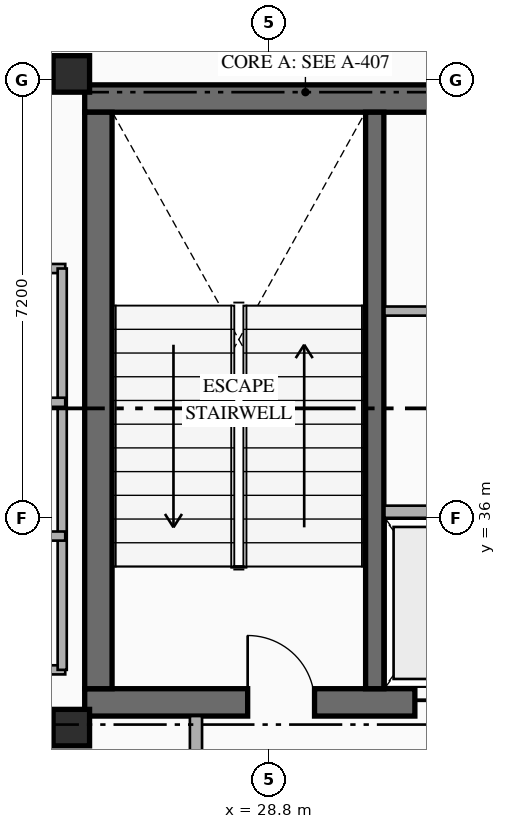
"""IFC4 building model, lengths in metres.
Left out: names, types, materials, properties, quantities, classifications, styles, units other than length and angle.
Written with IfcOpenShell. Run it as: python <this file> out.ifc"""

import sys

from ifc_helpers import new_model, si_unit, direction, frame, frame_2d, origin, origin_2d, place, context, subcontext, project, spatial, rectangle, hollow_rectangle, extrude, element, fill, save


model = new_model("IFC4")
c1 = context("Model", 3, precision=1e-05, world=origin(), true_north=direction((0.0, 1.0)))
c2 = subcontext(c1, "Body", "Model", "MODEL_VIEW")
j1 = project(units=[si_unit("LENGTHUNIT", "METRE"), si_unit("PLANEANGLEUNIT", "RADIAN")], contexts=[c1])
p1 = place(None, origin())
s1 = spatial("IfcSite", under=j1, at=p1, CompositionType="ELEMENT")
p2 = place(p1, origin())
s2 = spatial("IfcBuilding", under=s1, at=p2, CompositionType="ELEMENT")
p3 = place(p2, frame((0.0, 0.0, 269.95)))
s3 = spatial("IfcBuildingStorey", under=s2, at=p3, CompositionType="ELEMENT", Elevation=269.95)
p4 = place(p3, frame((25.77, 32.965, 0.0), z_axis=(0.0, 0.0, 1.0), x_axis=(1.0, 0.0, 0.0)))
e1 = element("IfcWall", 1, at=p4, inside=s3, PredefinedType="SHEAR", context=c2, shape_type="SweptSolid", body=[
    extrude(rectangle(XDim=7.48, YDim=0.45, at=frame_2d((3.74, 0.0))), origin(), (0.0, 0.0, 1.0), 4.0),
])
p5 = place(p4, frame((2.68, 0.0, 0.0)))
e2 = element("IfcOpeningElement", 2, at=p5, cuts=e1, PredefinedType="OPENING", context=c2, shape_type="SweptSolid", body=[
    extrude(rectangle(XDim=1.1, YDim=2.2, at=frame_2d((0.55, 1.1))), frame((0.0, 0.235, 0.0), z_axis=(0.0, -1.0, 0.0), x_axis=(1.0, 0.0, 0.0)), (0.0, 0.0, 1.0), 0.47),
])
p6 = place(p4, frame((5.43, 0.0, 0.0)))
e3 = element("IfcOpeningElement", 3, at=p6, cuts=e1, PredefinedType="OPENING", context=c2, shape_type="SweptSolid", body=[
    extrude(rectangle(XDim=1.1, YDim=2.15, at=frame_2d((0.55, 1.075))), frame((0.0, 0.235, 0.0), z_axis=(0.0, -1.0, 0.0), x_axis=(1.0, 0.0, 0.0)), (0.0, 0.0, 1.0), 0.47),
])
p7 = place(p3, frame((25.77, 42.895, 0.0), z_axis=(0.0, 0.0, 1.0), x_axis=(1.0, 0.0, 0.0)))
e4 = element("IfcWall", 4, at=p7, inside=s3, PredefinedType="SHEAR", context=c2, shape_type="SweptSolid", body=[
    extrude(rectangle(XDim=7.48, YDim=0.45, at=frame_2d((3.74, 0.0))), origin(), (0.0, 0.0, 1.0), 4.0),
])
p8 = place(p3, frame((25.995, 33.19, 0.0), z_axis=(0.0, 0.0, 1.0), x_axis=(0.0, 1.0, 0.0)))
e5 = element("IfcWall", 5, at=p8, inside=s3, PredefinedType="SHEAR", context=c2, shape_type="SweptSolid", body=[
    extrude(rectangle(XDim=9.48, YDim=0.45, at=frame_2d((4.74, 0.0))), origin(), (0.0, 0.0, 1.0), 4.0),
])
p9 = place(p3, frame((30.54, 33.19, 0.0), z_axis=(0.0, 0.0, 1.0), x_axis=(0.0, 1.0, 0.0)))
e6 = element("IfcWall", 6, at=p9, inside=s3, PredefinedType="SHEAR", context=c2, shape_type="SweptSolid", body=[
    extrude(rectangle(XDim=9.48, YDim=0.3, at=frame_2d((4.74, 0.0))), origin(), (0.0, 0.0, 1.0), 4.0),
])
for number, where, z_axis, x_axis in (
    (7, (25.55, 32.55, 0.0), (0.0, 0.0, 1.0), (1.0, 0.0, 0.0)),
    (8, (25.55, 43.3, 0.0), (0.0, 0.0, 1.0), (1.0, 0.0, 0.0)),
):
    element("IfcColumn", number, at=place(p3, frame(where, z_axis=z_axis, x_axis=x_axis)), inside=s3, PredefinedType="COLUMN", context=c2, shape_type="SweptSolid", body=[
        extrude(hollow_rectangle(XDim=0.6, YDim=0.6, WallThickness=0.025, at=origin_2d()), origin(), (0.0, 0.0, 1.0), 4.0),
    ])
p10 = place(p3, frame((30.7, 36.1, 0.0), z_axis=(0.0, 0.0, 1.0), x_axis=(1.0, 0.0, 0.0)))
e9 = element("IfcWall", 9, at=p10, inside=s3, PredefinedType="STANDARD", context=c2, shape_type="SweptSolid", body=[
    extrude(rectangle(XDim=2.1, YDim=0.2, at=frame_2d((1.05, 0.0))), origin(), (0.0, 0.0, 1.0), 3.74),
])
p11 = place(p3, frame((30.7, 39.4, 0.0), z_axis=(0.0, 0.0, 1.0), x_axis=(1.0, 0.0, 0.0)))
e10 = element("IfcWall", 10, at=p11, inside=s3, PredefinedType="PARTITIONING", context=c2, shape_type="SweptSolid", body=[
    extrude(rectangle(XDim=2.1, YDim=0.15, at=frame_2d((1.05, 0.0))), origin(), (0.0, 0.0, 1.0), 3.74),
])
p12 = place(p3, frame((27.6, 29.2, 0.0), z_axis=(0.0, 0.0, 1.0), x_axis=(0.0, 1.0, 0.0)))
e11 = element("IfcWall", 11, at=p12, inside=s3, PredefinedType="STANDARD", context=c2, shape_type="SweptSolid", body=[
    extrude(rectangle(XDim=3.54, YDim=0.2, at=frame_2d((1.77, 0.0))), origin(), (0.0, 0.0, 1.0), 3.74),
])
for number, where, z_axis, x_axis in (
    (12, (22.15, 33.5, 0.0), (0.0, 0.0, 1.0), (1.0, 0.0, 0.0)),
    (13, (22.15, 40.1, 0.0), (0.0, 0.0, 1.0), (1.0, 0.0, 0.0)),
):
    element("IfcWall", number, at=place(p3, frame(where, z_axis=z_axis, x_axis=x_axis)), inside=s3, PredefinedType="PARTITIONING", context=c2, shape_type="SweptSolid", body=[
        extrude(rectangle(XDim=3.3, YDim=0.15, at=frame_2d((1.65, 0.0))), origin(), (0.0, 0.0, 1.0), 3.74),
    ])
p13 = place(p3, frame((25.4, 33.5, 0.0), z_axis=(0.0, 0.0, 1.0), x_axis=(0.0, 1.0, 0.0)))
e14 = element("IfcWall", 14, at=p13, inside=s3, PredefinedType="PARTITIONING", context=c2, shape_type="SweptSolid", body=[
    extrude(rectangle(XDim=6.6, YDim=0.15, at=frame_2d((3.3, 0.0))), origin(), (0.0, 0.0, 1.0), 3.74),
])
for number, where, z_axis, x_axis in (
    (15, (22.15, 35.7, 0.0), (0.0, 0.0, 1.0), (1.0, 0.0, 0.0)),
    (16, (22.15, 37.9, 0.0), (0.0, 0.0, 1.0), (1.0, 0.0, 0.0)),
):
    element("IfcWall", number, at=place(p3, frame(where, z_axis=z_axis, x_axis=x_axis)), inside=s3, PredefinedType="PARTITIONING", context=c2, shape_type="SweptSolid", body=[
        extrude(rectangle(XDim=3.3, YDim=0.15, at=frame_2d((1.65, 0.0))), origin(), (0.0, 0.0, 1.0), 3.74),
    ])
p14 = place(p5, origin())
e17 = element("IfcDoor", 17, at=p14, inside=s3, OperationType="SINGLE_SWING_LEFT", PredefinedType="DOOR", context=c2, shape_type="SweptSolid", body=[
    extrude(rectangle(XDim=1.1, YDim=2.2, at=frame_2d((0.55, 1.1))), frame((0.0, 0.025, 0.0), z_axis=(0.0, -1.0, 0.0), x_axis=(1.0, 0.0, 0.0)), (0.0, 0.0, 1.0), 0.05),
])
fill(e2, e17)
p15 = place(p6, origin())
e18 = element("IfcDoor", 18, at=p15, inside=s3, OperationType="SLIDING_TO_LEFT", PredefinedType="USERDEFINED", context=c2, shape_type="SweptSolid", body=[
    extrude(rectangle(XDim=1.1, YDim=2.15, at=frame_2d((0.55, 1.075))), frame((0.0, 0.025, 0.0), z_axis=(0.0, -1.0, 0.0), x_axis=(1.0, 0.0, 0.0)), (0.0, 0.0, 1.0), 0.05),
])
fill(e3, e18)
save(model, sys.argv[1])
